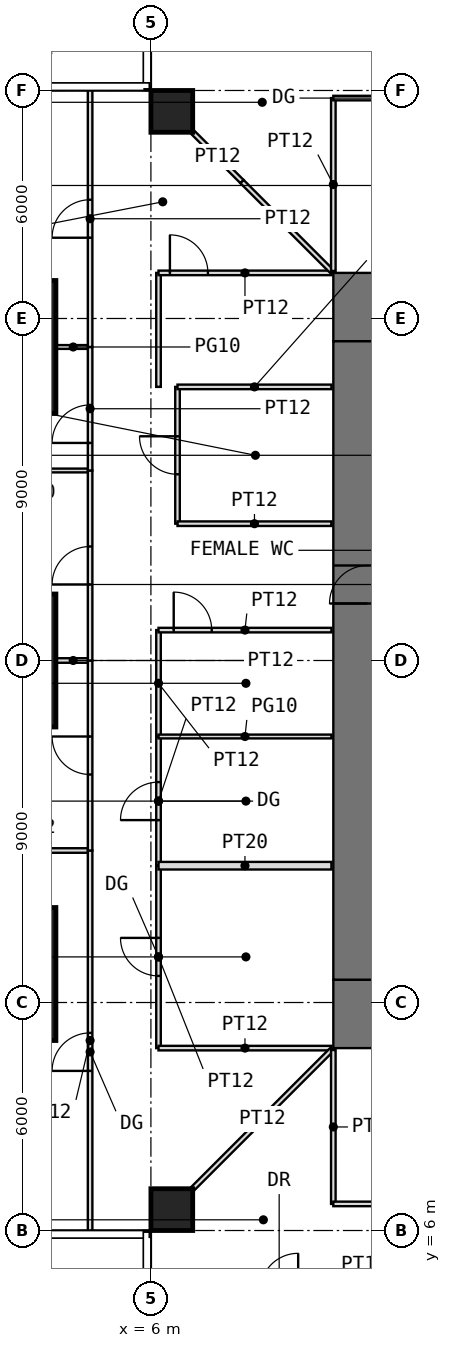
"""IFC4 building model, lengths in metres.
Left out: names, types, materials, properties, quantities, classifications, styles, units other than length and angle.
Written with IfcOpenShell. Run it as: python <this file> out.ifc"""

import sys

from ifc_helpers import new_model, si_unit, direction, frame, frame_2d, origin, origin_2d, place, context, subcontext, project, spatial, rectangle, extrude, element, fill, save


model = new_model("IFC4")
c1 = context("Model", 3, precision=1e-05, world=origin(), true_north=direction((0.0, 1.0)))
c2 = subcontext(c1, "Body", "Model", "MODEL_VIEW")
j1 = project(units=[si_unit("LENGTHUNIT", "METRE"), si_unit("PLANEANGLEUNIT", "RADIAN")], contexts=[c1])
p1 = place(None, origin())
s1 = spatial("IfcSite", under=j1, at=p1, CompositionType="ELEMENT")
p2 = place(p1, origin())
s2 = spatial("IfcBuilding", under=s1, at=p2, CompositionType="ELEMENT")
p3 = place(p2, frame((0.0, 0.0, 78.5)))
s3 = spatial("IfcBuildingStorey", under=s2, at=p3, CompositionType="ELEMENT", Elevation=78.5)
p4 = place(p3, frame((6.55, 6.55, 0.0), z_axis=(0.0, 0.0, 1.0), x_axis=(1.0, 0.0, 0.0)))
e1 = element("IfcColumn", 1, at=p4, inside=s3, PredefinedType="COLUMN", context=c2, shape_type="SweptSolid", body=[
    extrude(rectangle(XDim=1.1, YDim=1.1, at=origin_2d()), origin(), (0.0, 0.0, 1.0), 4.0),
])
for number, where, z_axis, x_axis in (
    (2, (1.75, 12.75, 0.0), (0.0, 0.0, 1.0), (1.0, 0.0, 0.0)),
    (3, (1.75, 21.0, 0.0), (0.0, 0.0, 1.0), (1.0, 0.0, 0.0)),
    (4, (1.75, 29.25, 0.0), (0.0, 0.0, 1.0), (1.0, 0.0, 0.0)),
):
    element("IfcColumn", number, at=place(p3, frame(where, z_axis=z_axis, x_axis=x_axis)), inside=s3, PredefinedType="COLUMN", context=c2, shape_type="SweptSolid", body=[
        extrude(rectangle(XDim=3.5, YDim=3.5, at=origin_2d()), origin(), (0.0, 0.0, 1.0), 4.0),
    ])
p5 = place(p3, frame((6.55, 35.45, 0.0), z_axis=(0.0, 0.0, 1.0), x_axis=(1.0, 0.0, 0.0)))
e5 = element("IfcColumn", 5, at=p5, inside=s3, PredefinedType="COLUMN", context=c2, shape_type="SweptSolid", body=[
    extrude(rectangle(XDim=1.1, YDim=1.1, at=origin_2d()), origin(), (0.0, 0.0, 1.0), 4.0),
])
p6 = place(p3, frame((10.8, 11.7, -0.05), z_axis=(0.0, 0.0, 1.0), x_axis=(1.0, 0.0, 0.0)))
e6 = element("IfcWall", 6, at=p6, inside=s3, PredefinedType="SHEAR", context=c2, shape_type="SweptSolid", body=[
    extrude(rectangle(XDim=20.4, YDim=1.8, at=frame_2d((10.2, 0.0))), origin(), (0.0, 0.0, 1.0), 4.0),
])
p7 = place(p6, frame((9.2, 0.0, 0.05)))
e7 = element("IfcOpeningElement", 7, at=p7, cuts=e6, PredefinedType="OPENING", context=c2, shape_type="SweptSolid", body=[
    extrude(rectangle(XDim=2.0, YDim=2.2, at=frame_2d((1.0, 1.1))), frame((0.0, 0.91, 0.0), z_axis=(0.0, -1.0, 0.0), x_axis=(1.0, 0.0, 0.0)), (0.0, 0.0, 1.0), 1.82),
])
p8 = place(p3, frame((10.8, 30.3, -0.05), z_axis=(0.0, 0.0, 1.0), x_axis=(1.0, 0.0, 0.0)))
e8 = element("IfcWall", 8, at=p8, inside=s3, PredefinedType="SHEAR", context=c2, shape_type="SweptSolid", body=[
    extrude(rectangle(XDim=20.4, YDim=1.8, at=frame_2d((10.2, 0.0))), origin(), (0.0, 0.0, 1.0), 4.0),
])
p9 = place(p8, frame((9.2, 0.0, 0.05)))
e9 = element("IfcOpeningElement", 9, at=p9, cuts=e8, PredefinedType="OPENING", context=c2, shape_type="SweptSolid", body=[
    extrude(rectangle(XDim=2.0, YDim=2.2, at=frame_2d((1.0, 1.1))), frame((0.0, 0.91, 0.0), z_axis=(0.0, -1.0, 0.0), x_axis=(1.0, 0.0, 0.0)), (0.0, 0.0, 1.0), 1.82),
])
p10 = place(p3, frame((11.7, 12.6, -0.05), z_axis=(0.0, 0.0, 1.0), x_axis=(0.0, 1.0, 0.0)))
e10 = element("IfcWall", 10, at=p10, inside=s3, PredefinedType="SHEAR", context=c2, shape_type="SweptSolid", body=[
    extrude(rectangle(XDim=16.8, YDim=1.8, at=frame_2d((8.4, 0.0))), origin(), (0.0, 0.0, 1.0), 4.0),
])
p11 = place(p10, frame((9.9, 0.0, 0.05)))
e11 = element("IfcOpeningElement", 11, at=p11, cuts=e10, PredefinedType="OPENING", context=c2, shape_type="SweptSolid", body=[
    extrude(rectangle(XDim=1.0, YDim=2.2, at=frame_2d((0.5, 1.1))), frame((0.0, 0.91, 0.0), z_axis=(0.0, -1.0, 0.0), x_axis=(1.0, 0.0, 0.0)), (0.0, 0.0, 1.0), 1.82),
])
p12 = place(p3, frame((1.41, 16.0, 0.0), z_axis=(0.0, 0.0, 1.0), x_axis=(1.0, 0.0, 0.0)))
e12 = element("IfcWall", 12, at=p12, inside=s3, PredefinedType="PARTITIONING", context=c2, shape_type="SweptSolid", body=[
    extrude(rectangle(XDim=2.99, YDim=0.12, at=frame_2d((1.495, 0.0))), origin(), (0.0, 0.0, 1.0), 3.75),
])
p13 = place(p3, frame((1.41, 26.0, 0.0), z_axis=(0.0, 0.0, 1.0), x_axis=(1.0, 0.0, 0.0)))
e13 = element("IfcWall", 13, at=p13, inside=s3, PredefinedType="PARTITIONING", context=c2, shape_type="SweptSolid", body=[
    extrude(rectangle(XDim=2.99, YDim=0.1, at=frame_2d((1.495, 0.0))), origin(), (0.0, 0.0, 1.0), 3.75),
])
p14 = place(p3, frame((3.51, 21.0, 0.0), z_axis=(0.0, 0.0, 1.0), x_axis=(1.0, 0.0, 0.0)))
e14 = element("IfcWall", 14, at=p14, inside=s3, PredefinedType="PARTITIONING", context=c2, shape_type="SweptSolid", body=[
    extrude(rectangle(XDim=0.89, YDim=0.12, at=frame_2d((0.445, 0.0))), origin(), (0.0, 0.0, 1.0), 3.75),
])
p15 = place(p3, frame((3.51, 29.25, 0.0), z_axis=(0.0, 0.0, 1.0), x_axis=(1.0, 0.0, 0.0)))
e15 = element("IfcWall", 15, at=p15, inside=s3, PredefinedType="PARTITIONING", context=c2, shape_type="SweptSolid", body=[
    extrude(rectangle(XDim=0.89, YDim=0.1, at=frame_2d((0.445, 0.0))), origin(), (0.0, 0.0, 1.0), 3.75),
])
p16 = place(p3, frame((4.4, 6.0, 0.0), z_axis=(0.0, 0.0, 1.0), x_axis=(0.0, 1.0, 0.0)))
e16 = element("IfcWall", 16, at=p16, inside=s3, PredefinedType="PARTITIONING", context=c2, shape_type="SweptSolid", body=[
    extrude(rectangle(XDim=10.0, YDim=0.12, at=frame_2d((5.0, 0.0))), origin(), (0.0, 0.0, 1.0), 3.75),
])
p17 = place(p16, frame((4.2, 0.0, 0.0)))
e17 = element("IfcOpeningElement", 17, at=p17, cuts=e16, PredefinedType="OPENING", context=c2, shape_type="SweptSolid", body=[
    extrude(rectangle(XDim=1.0, YDim=2.4, at=frame_2d((0.5, 1.2))), frame((0.0, 0.07, 0.0), z_axis=(0.0, -1.0, 0.0), x_axis=(1.0, 0.0, 0.0)), (0.0, 0.0, 1.0), 0.14),
])
p18 = place(p3, frame((4.4, 16.0, 0.0), z_axis=(0.0, 0.0, 1.0), x_axis=(0.0, 1.0, 0.0)))
e18 = element("IfcWall", 18, at=p18, inside=s3, PredefinedType="PARTITIONING", context=c2, shape_type="SweptSolid", body=[
    extrude(rectangle(XDim=5.0, YDim=0.12, at=frame_2d((2.5, 0.0))), origin(), (0.0, 0.0, 1.0), 3.75),
])
p19 = place(p18, frame((2.0, 0.0, 0.0)))
e19 = element("IfcOpeningElement", 19, at=p19, cuts=e18, PredefinedType="OPENING", context=c2, shape_type="SweptSolid", body=[
    extrude(rectangle(XDim=1.0, YDim=2.2, at=frame_2d((0.5, 1.1))), frame((0.0, 0.07, 0.0), z_axis=(0.0, -1.0, 0.0), x_axis=(1.0, 0.0, 0.0)), (0.0, 0.0, 1.0), 0.14),
])
p20 = place(p3, frame((4.4, 21.0, 0.0), z_axis=(0.0, 0.0, 1.0), x_axis=(0.0, 1.0, 0.0)))
e20 = element("IfcWall", 20, at=p20, inside=s3, PredefinedType="PARTITIONING", context=c2, shape_type="SweptSolid", body=[
    extrude(rectangle(XDim=5.0, YDim=0.12, at=frame_2d((2.5, 0.0))), origin(), (0.0, 0.0, 1.0), 3.75),
])
p21 = place(p20, frame((2.0, 0.0, 0.0)))
e21 = element("IfcOpeningElement", 21, at=p21, cuts=e20, PredefinedType="OPENING", context=c2, shape_type="SweptSolid", body=[
    extrude(rectangle(XDim=1.0, YDim=2.4, at=frame_2d((0.5, 1.2))), frame((0.0, 0.07, 0.0), z_axis=(0.0, -1.0, 0.0), x_axis=(1.0, 0.0, 0.0)), (0.0, 0.0, 1.0), 0.14),
])
p22 = place(p3, frame((4.4, 26.0, 0.0), z_axis=(0.0, 0.0, 1.0), x_axis=(0.0, 1.0, 0.0)))
e22 = element("IfcWall", 22, at=p22, inside=s3, PredefinedType="PARTITIONING", context=c2, shape_type="SweptSolid", body=[
    extrude(rectangle(XDim=3.25, YDim=0.12, at=frame_2d((1.625, 0.0))), origin(), (0.0, 0.0, 1.0), 3.75),
])
p23 = place(p22, frame((0.725, 0.0, 0.0)))
e23 = element("IfcOpeningElement", 23, at=p23, cuts=e22, PredefinedType="OPENING", context=c2, shape_type="SweptSolid", body=[
    extrude(rectangle(XDim=1.0, YDim=2.4, at=frame_2d((0.5, 1.2))), frame((0.0, 0.07, 0.0), z_axis=(0.0, -1.0, 0.0), x_axis=(1.0, 0.0, 0.0)), (0.0, 0.0, 1.0), 0.14),
])
p24 = place(p3, frame((4.4, 29.25, 0.0), z_axis=(0.0, 0.0, 1.0), x_axis=(0.0, 1.0, 0.0)))
e24 = element("IfcWall", 24, at=p24, inside=s3, PredefinedType="PARTITIONING", context=c2, shape_type="SweptSolid", body=[
    extrude(rectangle(XDim=6.75, YDim=0.12, at=frame_2d((3.375, 0.0))), origin(), (0.0, 0.0, 1.0), 3.75),
])
p25 = place(p24, frame((2.875, 0.0, 0.0)))
e25 = element("IfcOpeningElement", 25, at=p25, cuts=e24, PredefinedType="OPENING", context=c2, shape_type="SweptSolid", body=[
    extrude(rectangle(XDim=1.0, YDim=2.4, at=frame_2d((0.5, 1.2))), frame((0.0, 0.07, 0.0), z_axis=(0.0, -1.0, 0.0), x_axis=(1.0, 0.0, 0.0)), (0.0, 0.0, 1.0), 0.14),
])
p26 = place(p3, frame((6.2, 10.8, 0.0), z_axis=(0.0, 0.0, 1.0), x_axis=(0.0, 1.0, 0.0)))
e26 = element("IfcWall", 26, at=p26, inside=s3, PredefinedType="PARTITIONING", context=c2, shape_type="SweptSolid", body=[
    extrude(rectangle(XDim=4.8, YDim=0.12, at=frame_2d((2.4, 0.0))), origin(), (0.0, 0.0, 1.0), 3.75),
])
p27 = place(p26, frame((1.9, 0.0, 0.0)))
e27 = element("IfcOpeningElement", 27, at=p27, cuts=e26, PredefinedType="OPENING", context=c2, shape_type="SweptSolid", body=[
    extrude(rectangle(XDim=1.0, YDim=2.4, at=frame_2d((0.5, 1.2))), frame((0.0, 0.07, 0.0), z_axis=(0.0, -1.0, 0.0), x_axis=(1.0, 0.0, 0.0)), (0.0, 0.0, 1.0), 0.14),
])
p28 = place(p3, frame((6.2, 10.8, 0.0), z_axis=(0.0, 0.0, 1.0), x_axis=(1.0, 0.0, 0.0)))
e28 = element("IfcWall", 28, at=p28, inside=s3, PredefinedType="PARTITIONING", context=c2, shape_type="SweptSolid", body=[
    extrude(rectangle(XDim=4.55, YDim=0.12, at=frame_2d((2.275, 0.0))), origin(), (0.0, 0.0, 1.0), 3.75),
])
p29 = place(p3, frame((6.2, 15.6, 0.0), z_axis=(0.0, 0.0, 1.0), x_axis=(0.0, 1.0, 0.0)))
e29 = element("IfcWall", 29, at=p29, inside=s3, PredefinedType="PARTITIONING", context=c2, shape_type="SweptSolid", body=[
    extrude(rectangle(XDim=3.4, YDim=0.12, at=frame_2d((1.7, 0.0))), origin(), (0.0, 0.0, 1.0), 3.75),
])
p30 = place(p29, frame((1.2, 0.0, 0.0)))
e30 = element("IfcOpeningElement", 30, at=p30, cuts=e29, PredefinedType="OPENING", context=c2, shape_type="SweptSolid", body=[
    extrude(rectangle(XDim=1.0, YDim=2.4, at=frame_2d((0.5, 1.2))), frame((0.0, 0.07, 0.0), z_axis=(0.0, -1.0, 0.0), x_axis=(1.0, 0.0, 0.0)), (0.0, 0.0, 1.0), 0.14),
])
p31 = place(p3, frame((6.2, 15.6, 0.0), z_axis=(0.0, 0.0, 1.0), x_axis=(1.0, 0.0, 0.0)))
e31 = element("IfcWall", 31, at=p31, inside=s3, PredefinedType="PARTITIONING", context=c2, shape_type="SweptSolid", body=[
    extrude(rectangle(XDim=4.55, YDim=0.2, at=frame_2d((2.275, 0.0))), origin(), (0.0, 0.0, 1.0), 3.75),
])
p32 = place(p3, frame((6.2, 19.0, 0.0), z_axis=(0.0, 0.0, 1.0), x_axis=(0.0, 1.0, 0.0)))
e32 = element("IfcWall", 32, at=p32, inside=s3, PredefinedType="PARTITIONING", context=c2, shape_type="SweptSolid", body=[
    extrude(rectangle(XDim=2.8, YDim=0.12, at=frame_2d((1.4, 0.0))), origin(), (0.0, 0.0, 1.0), 3.75),
])
p33 = place(p3, frame((6.2, 19.0, 0.0), z_axis=(0.0, 0.0, 1.0), x_axis=(1.0, 0.0, 0.0)))
e33 = element("IfcWall", 33, at=p33, inside=s3, PredefinedType="PARTITIONING", context=c2, shape_type="SweptSolid", body=[
    extrude(rectangle(XDim=4.55, YDim=0.1, at=frame_2d((2.275, 0.0))), origin(), (0.0, 0.0, 1.0), 3.75),
])
p34 = place(p3, frame((6.2, 21.8, 0.0), z_axis=(0.0, 0.0, 1.0), x_axis=(1.0, 0.0, 0.0)))
e34 = element("IfcWall", 34, at=p34, inside=s3, PredefinedType="PARTITIONING", context=c2, shape_type="SweptSolid", body=[
    extrude(rectangle(XDim=4.55, YDim=0.12, at=frame_2d((2.275, 0.0))), origin(), (0.0, 0.0, 1.0), 3.75),
])
p35 = place(p34, frame((0.4, 0.0, 0.0)))
e35 = element("IfcOpeningElement", 35, at=p35, cuts=e34, PredefinedType="OPENING", context=c2, shape_type="SweptSolid", body=[
    extrude(rectangle(XDim=1.0, YDim=2.4, at=frame_2d((0.5, 1.2))), frame((0.0, 0.07, 0.0), z_axis=(0.0, -1.0, 0.0), x_axis=(1.0, 0.0, 0.0)), (0.0, 0.0, 1.0), 0.14),
])
p36 = place(p3, frame((6.2, 28.2, 0.0), z_axis=(0.0, 0.0, 1.0), x_axis=(0.0, 1.0, 0.0)))
e36 = element("IfcWall", 36, at=p36, inside=s3, PredefinedType="PARTITIONING", context=c2, shape_type="SweptSolid", body=[
    extrude(rectangle(XDim=3.0, YDim=0.12, at=frame_2d((1.5, 0.0))), origin(), (0.0, 0.0, 1.0), 3.75),
])
p37 = place(p3, frame((6.2, 31.2, 0.0), z_axis=(0.0, 0.0, 1.0), x_axis=(1.0, 0.0, 0.0)))
e37 = element("IfcWall", 37, at=p37, inside=s3, PredefinedType="PARTITIONING", context=c2, shape_type="SweptSolid", body=[
    extrude(rectangle(XDim=4.55, YDim=0.12, at=frame_2d((2.275, 0.0))), origin(), (0.0, 0.0, 1.0), 3.75),
])
p38 = place(p37, frame((0.3, 0.0, 0.0)))
e38 = element("IfcOpeningElement", 38, at=p38, cuts=e37, PredefinedType="OPENING", context=c2, shape_type="SweptSolid", body=[
    extrude(rectangle(XDim=1.0, YDim=2.4, at=frame_2d((0.5, 1.2))), frame((0.0, 0.07, 0.0), z_axis=(0.0, -1.0, 0.0), x_axis=(1.0, 0.0, 0.0)), (0.0, 0.0, 1.0), 0.14),
])
p39 = place(p3, frame((6.7, 24.6, 0.0), z_axis=(0.0, 0.0, 1.0), x_axis=(0.0, 1.0, 0.0)))
e39 = element("IfcWall", 39, at=p39, inside=s3, PredefinedType="PARTITIONING", context=c2, shape_type="SweptSolid", body=[
    extrude(rectangle(XDim=3.6, YDim=0.12, at=frame_2d((1.8, 0.0))), origin(), (0.0, 0.0, 1.0), 3.75),
])
p40 = place(p39, frame((1.3, 0.0, 0.0)))
e40 = element("IfcOpeningElement", 40, at=p40, cuts=e39, PredefinedType="OPENING", context=c2, shape_type="SweptSolid", body=[
    extrude(rectangle(XDim=1.0, YDim=2.2, at=frame_2d((0.5, 1.1))), frame((0.0, 0.07, 0.0), z_axis=(0.0, -1.0, 0.0), x_axis=(1.0, 0.0, 0.0)), (0.0, 0.0, 1.0), 0.14),
])
for number, where, z_axis, x_axis in (
    (41, (6.7, 24.6, 0.0), (0.0, 0.0, 1.0), (1.0, 0.0, 0.0)),
    (42, (6.7, 28.2, 0.0), (0.0, 0.0, 1.0), (1.0, 0.0, 0.0)),
):
    element("IfcWall", number, at=place(p3, frame(where, z_axis=z_axis, x_axis=x_axis)), inside=s3, PredefinedType="PARTITIONING", context=c2, shape_type="SweptSolid", body=[
        extrude(rectangle(XDim=4.05, YDim=0.12, at=frame_2d((2.025, 0.0))), origin(), (0.0, 0.0, 1.0), 3.75),
    ])
p41 = place(p3, frame((7.11, 7.11, 0.0), z_axis=(0.0, 0.0, 1.0), x_axis=(0.707106781187, 0.707106781187, 0.0)))
e43 = element("IfcWall", 43, at=p41, inside=s3, PredefinedType="PARTITIONING", context=c2, shape_type="SweptSolid", body=[
    extrude(rectangle(XDim=5.168, YDim=0.12, at=frame_2d((2.584, 0.0))), origin(), (0.0, 0.0, 1.0), 3.75),
])
p42 = place(p3, frame((7.11, 34.89, 0.0), z_axis=(0.0, 0.0, 1.0), x_axis=(0.707106781187, -0.707106781187, 0.0)))
e44 = element("IfcWall", 44, at=p42, inside=s3, PredefinedType="PARTITIONING", context=c2, shape_type="SweptSolid", body=[
    extrude(rectangle(XDim=1.822, YDim=0.12, at=frame_2d((0.911, 0.0))), origin(), (0.0, 0.0, 1.0), 3.75),
])
p43 = place(p3, frame((8.398, 33.602, 0.0), z_axis=(0.0, 0.0, 1.0), x_axis=(0.707106781187, -0.707106781187, 0.0)))
e45 = element("IfcWall", 45, at=p43, inside=s3, PredefinedType="PARTITIONING", context=c2, shape_type="SweptSolid", body=[
    extrude(rectangle(XDim=3.346, YDim=0.12, at=frame_2d((1.673, 0.0))), origin(), (0.0, 0.0, 1.0), 3.75),
])
p44 = place(p3, frame((10.8, 6.7, 0.0), z_axis=(0.0, 0.0, 1.0), x_axis=(0.0, 1.0, 0.0)))
e46 = element("IfcWall", 46, at=p44, inside=s3, PredefinedType="PARTITIONING", context=c2, shape_type="SweptSolid", body=[
    extrude(rectangle(XDim=4.05, YDim=0.12, at=frame_2d((2.025, 0.0))), origin(), (0.0, 0.0, 1.0), 3.75),
])
p45 = place(p3, frame((10.8, 6.7, 0.0), z_axis=(0.0, 0.0, 1.0), x_axis=(1.0, 0.0, 0.0)))
e47 = element("IfcWall", 47, at=p45, inside=s3, PredefinedType="PARTITIONING", context=c2, shape_type="SweptSolid", body=[
    extrude(rectangle(XDim=4.2, YDim=0.12, at=frame_2d((2.1, 0.0))), origin(), (0.0, 0.0, 1.0), 3.75),
])
p46 = place(p45, frame((1.6, 0.0, 0.0)))
e48 = element("IfcOpeningElement", 48, at=p46, cuts=e47, PredefinedType="OPENING", context=c2, shape_type="SweptSolid", body=[
    extrude(rectangle(XDim=1.0, YDim=2.2, at=frame_2d((0.5, 1.1))), frame((0.0, 0.07, 0.0), z_axis=(0.0, -1.0, 0.0), x_axis=(1.0, 0.0, 0.0)), (0.0, 0.0, 1.0), 0.14),
])
p47 = place(p3, frame((10.8, 31.25, 0.0), z_axis=(0.0, 0.0, 1.0), x_axis=(0.0, 1.0, 0.0)))
e49 = element("IfcWall", 49, at=p47, inside=s3, PredefinedType="PARTITIONING", context=c2, shape_type="SweptSolid", body=[
    extrude(rectangle(XDim=4.55, YDim=0.12, at=frame_2d((2.275, 0.0))), origin(), (0.0, 0.0, 1.0), 3.75),
])
p48 = place(p3, frame((10.8, 35.8, 0.0), z_axis=(0.0, 0.0, 1.0), x_axis=(1.0, 0.0, 0.0)))
e50 = element("IfcWall", 50, at=p48, inside=s3, PredefinedType="PARTITIONING", context=c2, shape_type="SweptSolid", body=[
    extrude(rectangle(XDim=3.2, YDim=0.12, at=frame_2d((1.6, 0.0))), origin(), (0.0, 0.0, 1.0), 3.75),
])
p49 = place(p48, frame((1.1, 0.0, 0.0)))
e51 = element("IfcOpeningElement", 51, at=p49, cuts=e50, PredefinedType="OPENING", context=c2, shape_type="SweptSolid", body=[
    extrude(rectangle(XDim=1.0, YDim=2.4, at=frame_2d((0.5, 1.2))), frame((0.0, 0.07, 0.0), z_axis=(0.0, -1.0, 0.0), x_axis=(1.0, 0.0, 0.0)), (0.0, 0.0, 1.0), 0.14),
])
p50 = place(p11, origin())
e52 = element("IfcDoor", 52, at=p50, inside=s3, OperationType="SINGLE_SWING_LEFT", PredefinedType="DOOR", context=c2, shape_type="SweptSolid", body=[
    extrude(rectangle(XDim=1.0, YDim=2.2, at=frame_2d((0.5, 1.1))), frame((0.0, 0.025, 0.0), z_axis=(0.0, -1.0, 0.0), x_axis=(1.0, 0.0, 0.0)), (0.0, 0.0, 1.0), 0.05),
])
fill(e11, e52)
p51 = place(p27, origin())
e53 = element("IfcDoor", 53, at=p51, inside=s3, OperationType="SINGLE_SWING_RIGHT", PredefinedType="DOOR", context=c2, shape_type="SweptSolid", body=[
    extrude(rectangle(XDim=1.0, YDim=2.4, at=frame_2d((0.5, 1.2))), frame((0.0, 0.025, 0.0), z_axis=(0.0, -1.0, 0.0), x_axis=(1.0, 0.0, 0.0)), (0.0, 0.0, 1.0), 0.05),
])
fill(e27, e53)
p52 = place(p30, origin())
e54 = element("IfcDoor", 54, at=p52, inside=s3, OperationType="SINGLE_SWING_LEFT", PredefinedType="DOOR", context=c2, shape_type="SweptSolid", body=[
    extrude(rectangle(XDim=1.0, YDim=2.4, at=frame_2d((0.5, 1.2))), frame((0.0, 0.025, 0.0), z_axis=(0.0, -1.0, 0.0), x_axis=(1.0, 0.0, 0.0)), (0.0, 0.0, 1.0), 0.05),
])
fill(e30, e54)
p53 = place(p40, origin())
e55 = element("IfcDoor", 55, at=p53, inside=s3, OperationType="SINGLE_SWING_RIGHT", PredefinedType="DOOR", context=c2, shape_type="SweptSolid", body=[
    extrude(rectangle(XDim=1.0, YDim=2.2, at=frame_2d((0.5, 1.1))), frame((0.0, 0.025, 0.0), z_axis=(0.0, -1.0, 0.0), x_axis=(1.0, 0.0, 0.0)), (0.0, 0.0, 1.0), 0.05),
])
fill(e40, e55)
p54 = place(p19, origin())
e56 = element("IfcDoor", 56, at=p54, inside=s3, OperationType="SINGLE_SWING_RIGHT", PredefinedType="DOOR", context=c2, shape_type="SweptSolid", body=[
    extrude(rectangle(XDim=1.0, YDim=2.2, at=frame_2d((0.5, 1.1))), frame((0.0, 0.025, 0.0), z_axis=(0.0, -1.0, 0.0), x_axis=(1.0, 0.0, 0.0)), (0.0, 0.0, 1.0), 0.05),
])
fill(e19, e56)
p55 = place(p23, origin())
e57 = element("IfcDoor", 57, at=p55, inside=s3, OperationType="SINGLE_SWING_LEFT", PredefinedType="DOOR", context=c2, shape_type="SweptSolid", body=[
    extrude(rectangle(XDim=1.0, YDim=2.4, at=frame_2d((0.5, 1.2))), frame((0.0, 0.025, 0.0), z_axis=(0.0, -1.0, 0.0), x_axis=(1.0, 0.0, 0.0)), (0.0, 0.0, 1.0), 0.05),
])
fill(e23, e57)
p56 = place(p17, origin())
e58 = element("IfcDoor", 58, at=p56, inside=s3, OperationType="SINGLE_SWING_LEFT", PredefinedType="DOOR", context=c2, shape_type="SweptSolid", body=[
    extrude(rectangle(XDim=1.0, YDim=2.4, at=frame_2d((0.5, 1.2))), frame((0.0, 0.025, 0.0), z_axis=(0.0, -1.0, 0.0), x_axis=(1.0, 0.0, 0.0)), (0.0, 0.0, 1.0), 0.05),
])
fill(e17, e58)
p57 = place(p21, origin())
e59 = element("IfcDoor", 59, at=p57, inside=s3, OperationType="SINGLE_SWING_LEFT", PredefinedType="DOOR", context=c2, shape_type="SweptSolid", body=[
    extrude(rectangle(XDim=1.0, YDim=2.4, at=frame_2d((0.5, 1.2))), frame((0.0, 0.025, 0.0), z_axis=(0.0, -1.0, 0.0), x_axis=(1.0, 0.0, 0.0)), (0.0, 0.0, 1.0), 0.05),
])
fill(e21, e59)
p58 = place(p25, origin())
e60 = element("IfcDoor", 60, at=p58, inside=s3, OperationType="SINGLE_SWING_LEFT", PredefinedType="DOOR", context=c2, shape_type="SweptSolid", body=[
    extrude(rectangle(XDim=1.0, YDim=2.4, at=frame_2d((0.5, 1.2))), frame((0.0, 0.025, 0.0), z_axis=(0.0, -1.0, 0.0), x_axis=(1.0, 0.0, 0.0)), (0.0, 0.0, 1.0), 0.05),
])
fill(e25, e60)
p59 = place(p38, origin())
e61 = element("IfcDoor", 61, at=p59, inside=s3, OperationType="SINGLE_SWING_LEFT", PredefinedType="DOOR", context=c2, shape_type="SweptSolid", body=[
    extrude(rectangle(XDim=1.0, YDim=2.4, at=frame_2d((0.5, 1.2))), frame((0.0, 0.025, 0.0), z_axis=(0.0, -1.0, 0.0), x_axis=(1.0, 0.0, 0.0)), (0.0, 0.0, 1.0), 0.05),
])
fill(e38, e61)
p60 = place(p35, origin())
e62 = element("IfcDoor", 62, at=p60, inside=s3, OperationType="SINGLE_SWING_LEFT", PredefinedType="DOOR", context=c2, shape_type="SweptSolid", body=[
    extrude(rectangle(XDim=1.0, YDim=2.4, at=frame_2d((0.5, 1.2))), frame((0.0, 0.025, 0.0), z_axis=(0.0, -1.0, 0.0), x_axis=(1.0, 0.0, 0.0)), (0.0, 0.0, 1.0), 0.05),
])
fill(e35, e62)
save(model, sys.argv[1])
